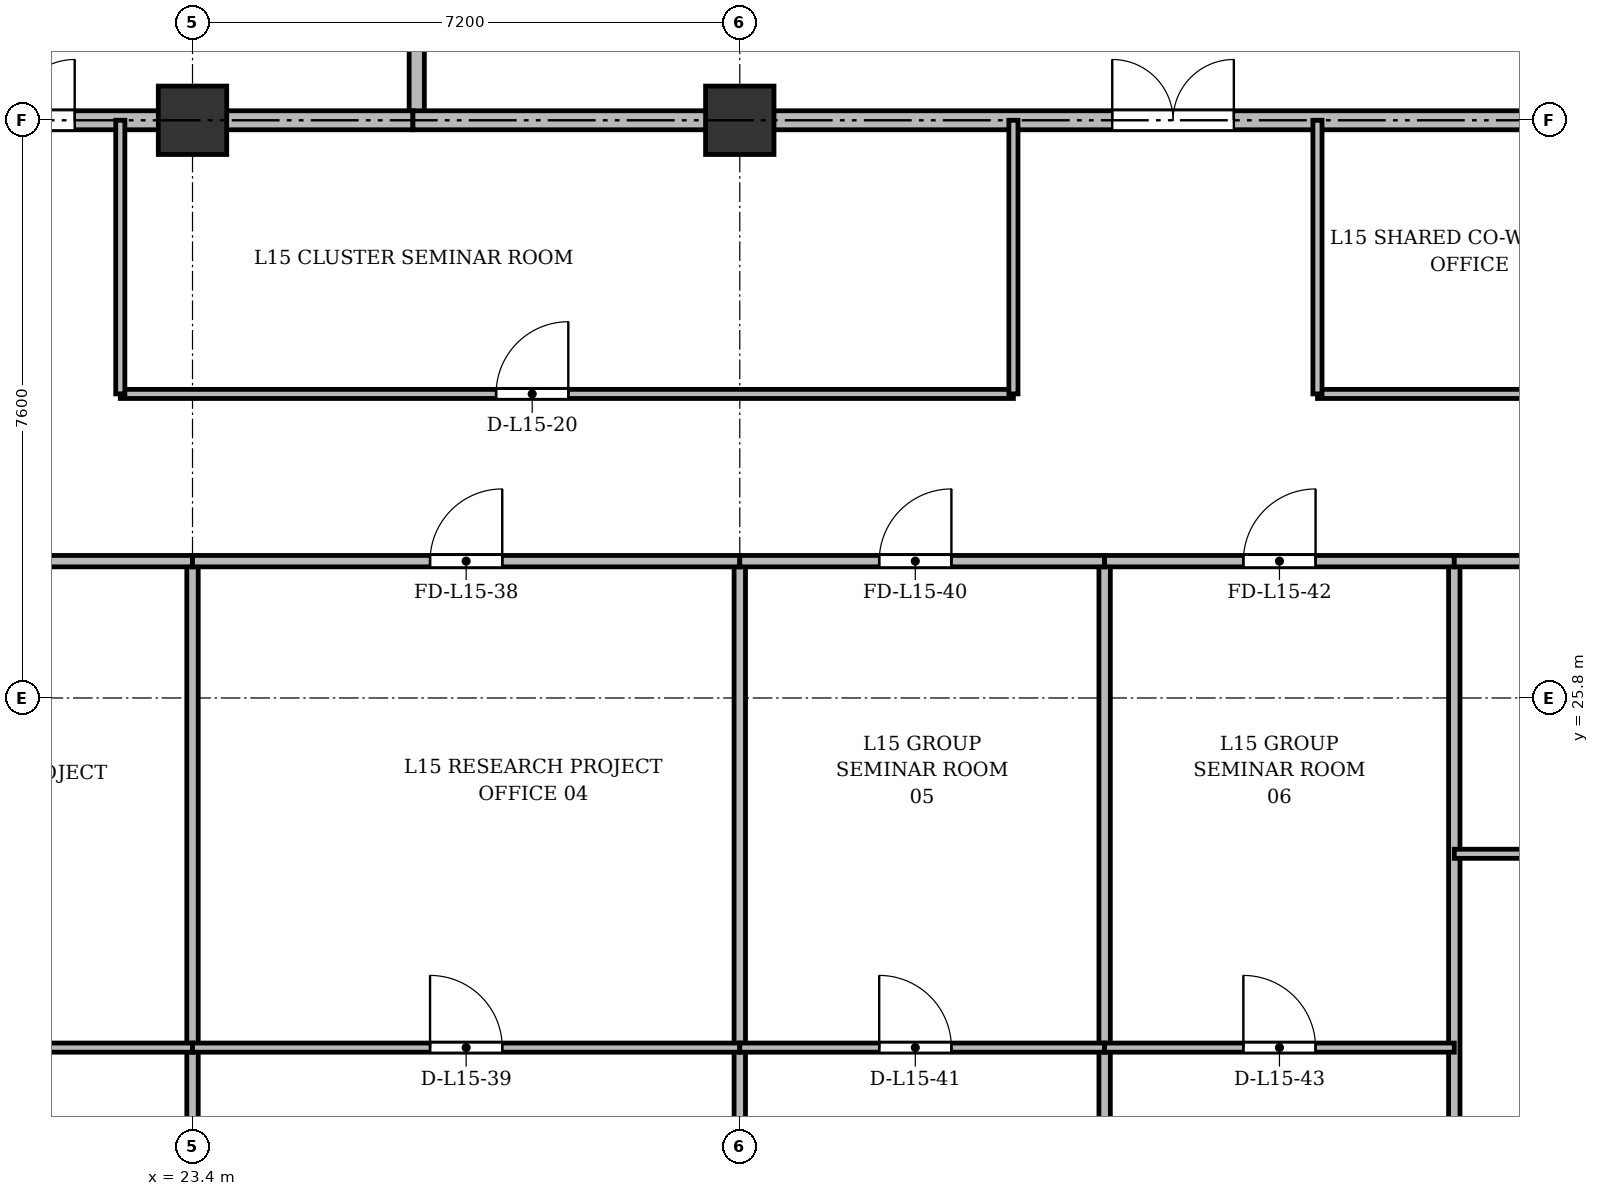
"""IFC4 building model, lengths in metres.
Left out: names, types, materials, properties, quantities, classifications, styles, units other than length and angle.
Written with IfcOpenShell. Run it as: python <this file> out.ifc"""

import sys

from ifc_helpers import new_model, si_unit, direction, frame, frame_2d, origin, origin_2d, place, context, subcontext, project, spatial, rectangle, extrude, source, transform, mapped, element, fill, save


model = new_model("IFC4")
c1 = context("Model", 3, precision=1e-05, world=origin(), true_north=direction((0.0, 1.0)))
c2 = subcontext(c1, "Body", "Model", "MODEL_VIEW")
j1 = project(units=[si_unit("LENGTHUNIT", "METRE"), si_unit("PLANEANGLEUNIT", "RADIAN")], contexts=[c1])
p1 = place(None, origin())
s1 = spatial("IfcSite", under=j1, at=p1, CompositionType="ELEMENT")
p2 = place(p1, origin())
s2 = spatial("IfcBuilding", under=s1, at=p2, CompositionType="ELEMENT")
p3 = place(p2, frame((0.0, 0.0, 59.5)))
s3 = spatial("IfcBuildingStorey", under=s2, at=p3, CompositionType="ELEMENT", Elevation=59.5)
m1 = source(origin(), c2, "Body", "SweptSolid", [
    extrude(rectangle(XDim=0.9, YDim=0.9, at=origin_2d()), origin(), (0.0, 0.0, 1.0), 3.6),
])
for number, where, z_axis, x_axis in (
    (1, (23.4, 33.4, 0.0), (0.0, 0.0, 1.0), (1.0, 0.0, 0.0)),
    (2, (30.6, 33.4, 0.0), (0.0, 0.0, 1.0), (1.0, 0.0, 0.0)),
):
    element("IfcColumn", number, at=place(p3, frame(where, z_axis=z_axis, x_axis=x_axis)), inside=s3, PredefinedType="COLUMN", context=c2, shape_type="MappedRepresentation", body=[
        mapped(m1, transform((0.0, 0.0, 0.0), x_axis=(1.0, 0.0, 0.0), y_axis=(0.0, 1.0, 0.0), z_axis=(0.0, 0.0, 1.0), scale=1.0)),
    ])
p4 = place(p3, frame((26.35, 33.4, 0.0), z_axis=(0.0, 0.0, 1.0), x_axis=(0.0, 1.0, 0.0)))
e3 = element("IfcWall", 3, at=p4, inside=s3, PredefinedType="SOLIDWALL", context=c2, shape_type="SweptSolid", body=[
    extrude(rectangle(XDim=11.3, YDim=0.2, at=frame_2d((5.65, 0.0))), origin(), (0.0, 0.0, 1.0), 2.69),
])
p5 = place(p3, frame((19.5, 33.4, 0.0), z_axis=(0.0, 0.0, 1.0), x_axis=(1.0, 0.0, 0.0)))
e4 = element("IfcWall", 4, at=p5, inside=s3, PredefinedType="PARTITIONING", context=c2, shape_type="SweptSolid", body=[
    extrude(rectangle(XDim=6.8, YDim=0.25, at=frame_2d((3.4, 0.0))), origin(), (0.0, 0.0, 1.0), 2.69),
])
p6 = place(p5, frame((0.75, 0.0, 0.0)))
e5 = element("IfcOpeningElement", 5, at=p6, cuts=e4, PredefinedType="OPENING", context=c2, shape_type="SweptSolid", body=[
    extrude(rectangle(XDim=1.6, YDim=2.2, at=frame_2d((0.8, 1.1))), frame((0.0, 0.135, 0.0), z_axis=(0.0, -1.0, 0.0), x_axis=(1.0, 0.0, 0.0)), (0.0, 0.0, 1.0), 0.27),
])
p7 = place(p3, frame((26.3, 33.4, 0.0), z_axis=(0.0, 0.0, 1.0), x_axis=(1.0, 0.0, 0.0)))
e6 = element("IfcWall", 6, at=p7, inside=s3, PredefinedType="PARTITIONING", context=c2, shape_type="SweptSolid", body=[
    extrude(rectangle(XDim=20.85, YDim=0.25, at=frame_2d((10.425, 0.0))), origin(), (0.0, 0.0, 1.0), 2.69),
])
p8 = place(p7, frame((9.2, 0.0, 0.0)))
e7 = element("IfcOpeningElement", 7, at=p8, cuts=e6, PredefinedType="OPENING", context=c2, shape_type="SweptSolid", body=[
    extrude(rectangle(XDim=1.6, YDim=2.2, at=frame_2d((0.8, 1.1))), frame((0.0, 0.135, 0.0), z_axis=(0.0, -1.0, 0.0), x_axis=(1.0, 0.0, 0.0)), (0.0, 0.0, 1.0), 0.27),
])
p9 = place(p3, frame((22.45, 29.8, 0.0), z_axis=(0.0, 0.0, 1.0), x_axis=(1.0, 0.0, 0.0)))
e8 = element("IfcWall", 8, at=p9, inside=s3, PredefinedType="PARTITIONING", context=c2, shape_type="SweptSolid", body=[
    extrude(rectangle(XDim=11.75, YDim=0.12, at=frame_2d((5.875, 0.0))), origin(), (0.0, 0.0, 1.0), 2.752),
])
p10 = place(p9, frame((4.944, 0.0, 0.0)))
e9 = element("IfcOpeningElement", 9, at=p10, cuts=e8, PredefinedType="OPENING", context=c2, shape_type="SweptSolid", body=[
    extrude(rectangle(XDim=0.95, YDim=2.15, at=frame_2d((0.475, 1.075))), frame((0.0, 0.07, 0.0), z_axis=(0.0, -1.0, 0.0), x_axis=(1.0, 0.0, 0.0)), (0.0, 0.0, 1.0), 0.14),
])
p11 = place(p3, frame((38.2, 29.8, 0.0), z_axis=(0.0, 0.0, 1.0), x_axis=(1.0, 0.0, 0.0)))
e10 = element("IfcWall", 10, at=p11, inside=s3, PredefinedType="PARTITIONING", context=c2, shape_type="SweptSolid", body=[
    extrude(rectangle(XDim=8.6, YDim=0.12, at=frame_2d((4.3, 0.0))), origin(), (0.0, 0.0, 1.0), 2.752),
])
p12 = place(p11, frame((3.462, 0.0, 0.0)))
e11 = element("IfcOpeningElement", 11, at=p12, cuts=e10, PredefinedType="OPENING", context=c2, shape_type="SweptSolid", body=[
    extrude(rectangle(XDim=0.95, YDim=2.15, at=frame_2d((0.475, 1.075))), frame((0.0, 0.07, 0.0), z_axis=(0.0, -1.0, 0.0), x_axis=(1.0, 0.0, 0.0)), (0.0, 0.0, 1.0), 0.14),
])
for number, where, z_axis, x_axis in (
    (12, (22.45, 29.8, 0.0), (0.0, 0.0, 1.0), (0.0, 1.0, 0.0)),
    (13, (34.2, 29.8, 0.0), (0.0, 0.0, 1.0), (0.0, 1.0, 0.0)),
    (14, (38.2, 29.8, 0.0), (0.0, 0.0, 1.0), (0.0, 1.0, 0.0)),
):
    element("IfcWall", number, at=place(p3, frame(where, z_axis=z_axis, x_axis=x_axis)), inside=s3, PredefinedType="PARTITIONING", context=c2, shape_type="SweptSolid", body=[
        extrude(rectangle(XDim=3.6, YDim=0.12, at=frame_2d((1.8, 0.0))), origin(), (0.0, 0.0, 1.0), 2.69),
    ])
for number, where, z_axis, x_axis in (
    (15, (23.4, 3.145, 0.0), (0.0, 0.0, 1.0), (0.0, 1.0, 0.0)),
    (16, (30.6, 3.145, 0.0), (0.0, 0.0, 1.0), (0.0, 1.0, 0.0)),
):
    element("IfcWall", number, at=place(p3, frame(where, z_axis=z_axis, x_axis=x_axis)), inside=s3, PredefinedType="PARTITIONING", context=c2, shape_type="SweptSolid", body=[
        extrude(rectangle(XDim=24.455, YDim=0.15, at=frame_2d((12.228, 0.0))), origin(), (0.0, 0.0, 1.0), 2.752),
    ])
for number, where, z_axis, x_axis in (
    (17, (35.4, 3.145, 0.0), (0.0, 0.0, 1.0), (0.0, 1.0, 0.0)),
    (18, (40.0, 3.145, 0.0), (0.0, 0.0, 1.0), (0.0, 1.0, 0.0)),
):
    element("IfcWall", number, at=place(p3, frame(where, z_axis=z_axis, x_axis=x_axis)), inside=s3, PredefinedType="PARTITIONING", context=c2, shape_type="SweptSolid", body=[
        extrude(rectangle(XDim=24.455, YDim=0.15, at=frame_2d((12.228, 0.0))), origin(), (0.0, 0.0, 1.0), 2.69),
    ])
p13 = place(p3, frame((15.6, 27.6, 0.0), z_axis=(0.0, 0.0, 1.0), x_axis=(1.0, 0.0, 0.0)))
e19 = element("IfcWall", 19, at=p13, inside=s3, PredefinedType="PARTITIONING", context=c2, shape_type="SweptSolid", body=[
    extrude(rectangle(XDim=7.8, YDim=0.15, at=frame_2d((3.9, 0.0))), origin(), (0.0, 0.0, 1.0), 2.752),
])
p14 = place(p13, frame((3.333, 0.0, 0.0)))
e20 = element("IfcOpeningElement", 20, at=p14, cuts=e19, PredefinedType="OPENING", context=c2, shape_type="SweptSolid", body=[
    extrude(rectangle(XDim=0.95, YDim=2.15, at=frame_2d((0.475, 1.075))), frame((0.0, 0.085, 0.0), z_axis=(0.0, -1.0, 0.0), x_axis=(1.0, 0.0, 0.0)), (0.0, 0.0, 1.0), 0.17),
])
p15 = place(p3, frame((15.6, 21.2, 0.0), z_axis=(0.0, 0.0, 1.0), x_axis=(1.0, 0.0, 0.0)))
e21 = element("IfcWall", 21, at=p15, inside=s3, PredefinedType="PARTITIONING", context=c2, shape_type="SweptSolid", body=[
    extrude(rectangle(XDim=7.8, YDim=0.12, at=frame_2d((3.9, 0.0))), origin(), (0.0, 0.0, 1.0), 2.752),
])
p16 = place(p15, frame((3.333, 0.0, 0.0)))
e22 = element("IfcOpeningElement", 22, at=p16, cuts=e21, PredefinedType="OPENING", context=c2, shape_type="SweptSolid", body=[
    extrude(rectangle(XDim=0.95, YDim=2.15, at=frame_2d((0.475, 1.075))), frame((0.0, 0.07, 0.0), z_axis=(0.0, -1.0, 0.0), x_axis=(1.0, 0.0, 0.0)), (0.0, 0.0, 1.0), 0.14),
])
p17 = place(p3, frame((23.4, 27.6, 0.0), z_axis=(0.0, 0.0, 1.0), x_axis=(1.0, 0.0, 0.0)))
e23 = element("IfcWall", 23, at=p17, inside=s3, PredefinedType="PARTITIONING", context=c2, shape_type="SweptSolid", body=[
    extrude(rectangle(XDim=7.2, YDim=0.15, at=frame_2d((3.6, 0.0))), origin(), (0.0, 0.0, 1.0), 2.752),
])
p18 = place(p17, frame((3.125, 0.0, 0.0)))
e24 = element("IfcOpeningElement", 24, at=p18, cuts=e23, PredefinedType="OPENING", context=c2, shape_type="SweptSolid", body=[
    extrude(rectangle(XDim=0.95, YDim=2.15, at=frame_2d((0.475, 1.075))), frame((0.0, 0.085, 0.0), z_axis=(0.0, -1.0, 0.0), x_axis=(1.0, 0.0, 0.0)), (0.0, 0.0, 1.0), 0.17),
])
p19 = place(p3, frame((23.4, 21.2, 0.0), z_axis=(0.0, 0.0, 1.0), x_axis=(1.0, 0.0, 0.0)))
e25 = element("IfcWall", 25, at=p19, inside=s3, PredefinedType="PARTITIONING", context=c2, shape_type="SweptSolid", body=[
    extrude(rectangle(XDim=7.2, YDim=0.12, at=frame_2d((3.6, 0.0))), origin(), (0.0, 0.0, 1.0), 2.752),
])
p20 = place(p19, frame((3.125, 0.0, 0.0)))
e26 = element("IfcOpeningElement", 26, at=p20, cuts=e25, PredefinedType="OPENING", context=c2, shape_type="SweptSolid", body=[
    extrude(rectangle(XDim=0.95, YDim=2.15, at=frame_2d((0.475, 1.075))), frame((0.0, 0.07, 0.0), z_axis=(0.0, -1.0, 0.0), x_axis=(1.0, 0.0, 0.0)), (0.0, 0.0, 1.0), 0.14),
])
p21 = place(p3, frame((30.6, 27.6, 0.0), z_axis=(0.0, 0.0, 1.0), x_axis=(1.0, 0.0, 0.0)))
e27 = element("IfcWall", 27, at=p21, inside=s3, PredefinedType="PARTITIONING", context=c2, shape_type="SweptSolid", body=[
    extrude(rectangle(XDim=4.8, YDim=0.15, at=frame_2d((2.4, 0.0))), origin(), (0.0, 0.0, 1.0), 2.752),
])
p22 = place(p21, frame((1.834, 0.0, 0.0)))
e28 = element("IfcOpeningElement", 28, at=p22, cuts=e27, PredefinedType="OPENING", context=c2, shape_type="SweptSolid", body=[
    extrude(rectangle(XDim=0.95, YDim=2.15, at=frame_2d((0.475, 1.075))), frame((0.0, 0.085, 0.0), z_axis=(0.0, -1.0, 0.0), x_axis=(1.0, 0.0, 0.0)), (0.0, 0.0, 1.0), 0.17),
])
p23 = place(p3, frame((30.6, 21.2, 0.0), z_axis=(0.0, 0.0, 1.0), x_axis=(1.0, 0.0, 0.0)))
e29 = element("IfcWall", 29, at=p23, inside=s3, PredefinedType="PARTITIONING", context=c2, shape_type="SweptSolid", body=[
    extrude(rectangle(XDim=4.8, YDim=0.12, at=frame_2d((2.4, 0.0))), origin(), (0.0, 0.0, 1.0), 2.752),
])
p24 = place(p23, frame((1.834, 0.0, 0.0)))
e30 = element("IfcOpeningElement", 30, at=p24, cuts=e29, PredefinedType="OPENING", context=c2, shape_type="SweptSolid", body=[
    extrude(rectangle(XDim=0.95, YDim=2.15, at=frame_2d((0.475, 1.075))), frame((0.0, 0.07, 0.0), z_axis=(0.0, -1.0, 0.0), x_axis=(1.0, 0.0, 0.0)), (0.0, 0.0, 1.0), 0.14),
])
p25 = place(p3, frame((35.4, 27.6, 0.0), z_axis=(0.0, 0.0, 1.0), x_axis=(1.0, 0.0, 0.0)))
e31 = element("IfcWall", 31, at=p25, inside=s3, PredefinedType="PARTITIONING", context=c2, shape_type="SweptSolid", body=[
    extrude(rectangle(XDim=4.6, YDim=0.15, at=frame_2d((2.3, 0.0))), origin(), (0.0, 0.0, 1.0), 3.34),
])
p26 = place(p25, frame((1.825, 0.0, 0.0)))
e32 = element("IfcOpeningElement", 32, at=p26, cuts=e31, PredefinedType="OPENING", context=c2, shape_type="SweptSolid", body=[
    extrude(rectangle(XDim=0.95, YDim=2.15, at=frame_2d((0.475, 1.075))), frame((0.0, 0.085, 0.0), z_axis=(0.0, -1.0, 0.0), x_axis=(1.0, 0.0, 0.0)), (0.0, 0.0, 1.0), 0.17),
])
p27 = place(p3, frame((35.4, 21.2, 0.0), z_axis=(0.0, 0.0, 1.0), x_axis=(1.0, 0.0, 0.0)))
e33 = element("IfcWall", 33, at=p27, inside=s3, PredefinedType="PARTITIONING", context=c2, shape_type="SweptSolid", body=[
    extrude(rectangle(XDim=4.6, YDim=0.12, at=frame_2d((2.3, 0.0))), origin(), (0.0, 0.0, 1.0), 3.34),
])
p28 = place(p27, frame((1.825, 0.0, 0.0)))
e34 = element("IfcOpeningElement", 34, at=p28, cuts=e33, PredefinedType="OPENING", context=c2, shape_type="SweptSolid", body=[
    extrude(rectangle(XDim=0.95, YDim=2.15, at=frame_2d((0.475, 1.075))), frame((0.0, 0.07, 0.0), z_axis=(0.0, -1.0, 0.0), x_axis=(1.0, 0.0, 0.0)), (0.0, 0.0, 1.0), 0.14),
])
p29 = place(p3, frame((40.0, 27.6, 0.0), z_axis=(0.0, 0.0, 1.0), x_axis=(1.0, 0.0, 0.0)))
e35 = element("IfcWall", 35, at=p29, inside=s3, PredefinedType="PARTITIONING", context=c2, shape_type="SweptSolid", body=[
    extrude(rectangle(XDim=3.8, YDim=0.15, at=frame_2d((1.9, 0.0))), origin(), (0.0, 0.0, 1.0), 2.752),
])
p30 = place(p29, frame((1.33, 0.0, 0.0)))
e36 = element("IfcOpeningElement", 36, at=p30, cuts=e35, PredefinedType="OPENING", context=c2, shape_type="SweptSolid", body=[
    extrude(rectangle(XDim=0.95, YDim=2.15, at=frame_2d((0.475, 1.075))), frame((0.0, 0.085, 0.0), z_axis=(0.0, -1.0, 0.0), x_axis=(1.0, 0.0, 0.0)), (0.0, 0.0, 1.0), 0.17),
])
p31 = place(p3, frame((40.0, 23.75, 0.0), z_axis=(0.0, 0.0, 1.0), x_axis=(1.0, 0.0, 0.0)))
e37 = element("IfcWall", 37, at=p31, inside=s3, PredefinedType="PARTITIONING", context=c2, shape_type="SweptSolid", body=[
    extrude(rectangle(XDim=3.8, YDim=0.12, at=frame_2d((1.9, 0.0))), origin(), (0.0, 0.0, 1.0), 2.752),
])
p32 = place(p31, frame((1.33, 0.0, 0.0)))
e38 = element("IfcOpeningElement", 38, at=p32, cuts=e37, PredefinedType="OPENING", context=c2, shape_type="SweptSolid", body=[
    extrude(rectangle(XDim=0.95, YDim=2.15, at=frame_2d((0.475, 1.075))), frame((0.0, 0.07, 0.0), z_axis=(0.0, -1.0, 0.0), x_axis=(1.0, 0.0, 0.0)), (0.0, 0.0, 1.0), 0.14),
])
m2 = source(origin(), c2, "Body", "SweptSolid", [
    extrude(rectangle(XDim=1.6, YDim=2.2, at=frame_2d((0.8, 1.1))), frame((0.0, 0.025, 0.0), z_axis=(0.0, -1.0, 0.0), x_axis=(1.0, 0.0, 0.0)), (0.0, 0.0, 1.0), 0.05),
])
p33 = place(p6, origin())
e39 = element("IfcDoor", 39, at=p33, inside=s3, OperationType="DOUBLE_DOOR_SINGLE_SWING", PredefinedType="DOOR", context=c2, shape_type="MappedRepresentation", body=[
    mapped(m2, transform((0.0, 0.0, 0.0), x_axis=(1.0, 0.0, 0.0), y_axis=(0.0, 1.0, 0.0), z_axis=(0.0, 0.0, 1.0), scale=1.0)),
])
fill(e5, e39)
p34 = place(p8, origin())
e40 = element("IfcDoor", 40, at=p34, inside=s3, OperationType="DOUBLE_DOOR_SINGLE_SWING", PredefinedType="DOOR", context=c2, shape_type="MappedRepresentation", body=[
    mapped(m2, transform((0.0, 0.0, 0.0), x_axis=(1.0, 0.0, 0.0), y_axis=(0.0, 1.0, 0.0), z_axis=(0.0, 0.0, 1.0), scale=1.0)),
])
fill(e7, e40)
m3 = source(origin(), c2, "Body", "SweptSolid", [
    extrude(rectangle(XDim=0.95, YDim=2.15, at=frame_2d((0.475, 1.075))), frame((0.0, 0.025, 0.0), z_axis=(0.0, -1.0, 0.0), x_axis=(1.0, 0.0, 0.0)), (0.0, 0.0, 1.0), 0.05),
])
p35 = place(p10, origin())
e41 = element("IfcDoor", 41, at=p35, inside=s3, OperationType="SINGLE_SWING_RIGHT", PredefinedType="DOOR", context=c2, shape_type="MappedRepresentation", body=[
    mapped(m3, transform((0.0, 0.0, 0.0), x_axis=(1.0, 0.0, 0.0), y_axis=(0.0, 1.0, 0.0), z_axis=(0.0, 0.0, 1.0), scale=1.0)),
])
fill(e9, e41)
p36 = place(p18, origin())
e42 = element("IfcDoor", 42, at=p36, inside=s3, OperationType="SINGLE_SWING_RIGHT", PredefinedType="DOOR", context=c2, shape_type="MappedRepresentation", body=[
    mapped(m3, transform((0.0, 0.0, 0.0), x_axis=(1.0, 0.0, 0.0), y_axis=(0.0, 1.0, 0.0), z_axis=(0.0, 0.0, 1.0), scale=1.0)),
])
fill(e24, e42)
p37 = place(p20, origin())
e43 = element("IfcDoor", 43, at=p37, inside=s3, OperationType="SINGLE_SWING_LEFT", PredefinedType="DOOR", context=c2, shape_type="MappedRepresentation", body=[
    mapped(m3, transform((0.0, 0.0, 0.0), x_axis=(1.0, 0.0, 0.0), y_axis=(0.0, 1.0, 0.0), z_axis=(0.0, 0.0, 1.0), scale=1.0)),
])
fill(e26, e43)
p38 = place(p22, origin())
e44 = element("IfcDoor", 44, at=p38, inside=s3, OperationType="SINGLE_SWING_RIGHT", PredefinedType="DOOR", context=c2, shape_type="MappedRepresentation", body=[
    mapped(m3, transform((0.0, 0.0, 0.0), x_axis=(1.0, 0.0, 0.0), y_axis=(0.0, 1.0, 0.0), z_axis=(0.0, 0.0, 1.0), scale=1.0)),
])
fill(e28, e44)
p39 = place(p24, origin())
e45 = element("IfcDoor", 45, at=p39, inside=s3, OperationType="SINGLE_SWING_LEFT", PredefinedType="DOOR", context=c2, shape_type="MappedRepresentation", body=[
    mapped(m3, transform((0.0, 0.0, 0.0), x_axis=(1.0, 0.0, 0.0), y_axis=(0.0, 1.0, 0.0), z_axis=(0.0, 0.0, 1.0), scale=1.0)),
])
fill(e30, e45)
p40 = place(p26, origin())
e46 = element("IfcDoor", 46, at=p40, inside=s3, OperationType="SINGLE_SWING_RIGHT", PredefinedType="DOOR", context=c2, shape_type="MappedRepresentation", body=[
    mapped(m3, transform((0.0, 0.0, 0.0), x_axis=(1.0, 0.0, 0.0), y_axis=(0.0, 1.0, 0.0), z_axis=(0.0, 0.0, 1.0), scale=1.0)),
])
fill(e32, e46)
p41 = place(p28, origin())
e47 = element("IfcDoor", 47, at=p41, inside=s3, OperationType="SINGLE_SWING_LEFT", PredefinedType="DOOR", context=c2, shape_type="MappedRepresentation", body=[
    mapped(m3, transform((0.0, 0.0, 0.0), x_axis=(1.0, 0.0, 0.0), y_axis=(0.0, 1.0, 0.0), z_axis=(0.0, 0.0, 1.0), scale=1.0)),
])
fill(e34, e47)
save(model, sys.argv[1])
